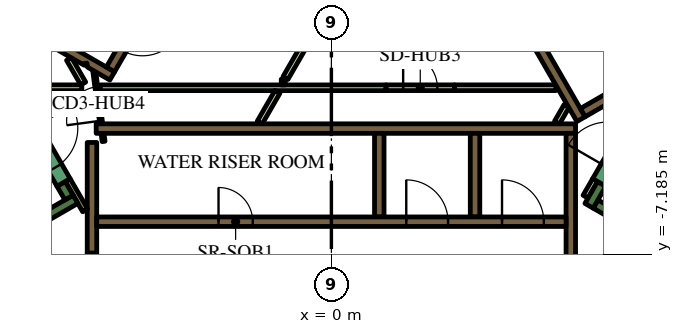
"""IFC4 building model, lengths in metres.
Left out: names, types, materials, properties, quantities, classifications, styles, units other than length and angle.
Written with IfcOpenShell. Run it as: python <this file> out.ifc"""

import sys

from ifc_helpers import new_model, si_unit, direction, frame, frame_2d, origin, place, context, subcontext, project, spatial, polyline, rectangle, outline, extrude, element, fill, save


model = new_model("IFC4")
c1 = context("Model", 3, precision=1e-05, world=origin(), true_north=direction((0.0, 1.0)))
c2 = subcontext(c1, "Body", "Model", "MODEL_VIEW")
j1 = project(units=[si_unit("LENGTHUNIT", "METRE"), si_unit("PLANEANGLEUNIT", "RADIAN")], contexts=[c1])
p1 = place(None, origin())
s1 = spatial("IfcSite", under=j1, at=p1, CompositionType="ELEMENT")
p2 = place(p1, origin())
s2 = spatial("IfcBuilding", under=s1, at=p2, CompositionType="ELEMENT")
p3 = place(p2, frame((0.0, 0.0, 54.9)))
s3 = spatial("IfcBuildingStorey", under=s2, at=p3, CompositionType="ELEMENT", Elevation=54.9)
p4 = place(p3, frame((6.776, 13.364, 0.0), z_axis=(0.0, 0.0, 1.0), x_axis=(0.500004177138, -0.8660229921, 0.0)))
e1 = element("IfcWall", 1, at=p4, inside=s3, PredefinedType="SOLIDWALL", context=c2, shape_type="SweptSolid", body=[
    extrude(rectangle(XDim=20.204, YDim=0.9, at=frame_2d((10.102, 0.0))), origin(), (0.0, 0.0, 1.0), 3.9),
])
p5 = place(p3, frame((12.84, -9.261, 0.0), z_axis=(0.0, 0.0, 1.0), x_axis=(-0.866013990052, 0.500019768644, 0.0)))
e2 = element("IfcWall", 2, at=p5, inside=s3, PredefinedType="SOLIDWALL", context=c2, shape_type="SweptSolid", body=[
    extrude(rectangle(XDim=6.8, YDim=0.25, at=frame_2d((3.4, 0.0))), origin(), (0.0, 0.0, 1.0), 3.9),
])
p6 = place(p3, frame((7.113, -5.33, 0.0), z_axis=(0.0, 0.0, 1.0), x_axis=(-0.499965889992, -0.866045096311, 0.0)))
e3 = element("IfcWall", 3, at=p6, inside=s3, PredefinedType="SOLIDWALL", context=c2, shape_type="SweptSolid", body=[
    extrude(rectangle(XDim=0.666, YDim=0.25, at=frame_2d((0.333, 0.0))), origin(), (0.0, 0.0, 1.0), 3.9),
])
p7 = place(p3, frame((-12.84, -9.261, 0.0), z_axis=(0.0, 0.0, 1.0), x_axis=(0.866016039709, 0.500016218704, 0.0)))
e4 = element("IfcWall", 4, at=p7, inside=s3, PredefinedType="SOLIDWALL", context=c2, shape_type="SweptSolid", body=[
    extrude(rectangle(XDim=7.05, YDim=0.25, at=frame_2d((3.525, 0.0))), origin(), (0.0, 0.0, 1.0), 3.9),
])
p8 = place(p3, frame((-6.905, -5.69, 0.0), z_axis=(0.0, 0.0, 1.0), x_axis=(-0.499993700073, 0.866029041019, 0.0)))
e5 = element("IfcWall", 5, at=p8, inside=s3, PredefinedType="SOLIDWALL", context=c2, shape_type="SweptSolid", body=[
    extrude(rectangle(XDim=0.416, YDim=0.25, at=frame_2d((0.208, 0.0))), origin(), (0.0, 0.0, 1.0), 3.9),
])
p9 = place(p3, frame((-6.3, -4.24, 0.0), z_axis=(0.0, 0.0, 1.0), x_axis=(0.0, -1.0, 0.0)))
e6 = element("IfcWall", 6, at=p9, inside=s3, PredefinedType="SOLIDWALL", context=c2, shape_type="SweptSolid", body=[
    extrude(rectangle(XDim=2.914, YDim=0.25, at=frame_2d((1.457, 0.0))), origin(), (0.0, 0.0, 1.0), 3.9),
])
p10 = place(p3, frame((-6.19, -3.875, 0.0), z_axis=(0.0, 0.0, 1.0), x_axis=(1.0, 0.0, 0.0)))
e7 = element("IfcWall", 7, at=p10, inside=s3, PredefinedType="SOLIDWALL", context=c2, shape_type="SweptSolid", body=[
    extrude(rectangle(XDim=12.615, YDim=0.25, at=frame_2d((6.307, 0.0))), origin(), (0.0, 0.0, 1.0), 3.9),
])
p11 = place(p3, frame((6.3, -7.268, 0.0), z_axis=(0.0, 0.0, 1.0), x_axis=(0.0, 1.0, 0.0)))
e8 = element("IfcWall", 8, at=p11, inside=s3, PredefinedType="SOLIDWALL", context=c2, shape_type="SweptSolid", body=[
    extrude(rectangle(XDim=3.268, YDim=0.25, at=frame_2d((1.634, 0.0))), origin(), (0.0, 0.0, 1.0), 3.9),
])
for number, where, z_axis, x_axis in (
    (9, (3.78, -4.0, 0.0), (0.0, 0.0, 1.0), (0.0, -1.0, 0.0)),
    (10, (1.26, -4.0, 0.0), (0.0, 0.0, 1.0), (0.0, -1.0, 0.0)),
):
    element("IfcWall", number, at=place(p3, frame(where, z_axis=z_axis, x_axis=x_axis)), inside=s3, PredefinedType="SOLIDWALL", context=c2, shape_type="SweptSolid", body=[
        extrude(rectangle(XDim=2.2, YDim=0.25, at=frame_2d((1.1, 0.0))), origin(), (0.0, 0.0, 1.0), 3.9),
    ])
p12 = place(p3, origin())
e11 = element("IfcWall", 11, at=p12, inside=s3, PredefinedType="SOLIDWALL", context=c2, shape_type="SweptSolid", body=[
    extrude(outline(polyline([(0.335, 6.925), (0.335, 6.925), (0.335, 7.075), (0.335, 7.075), (0.335, 7.075), (0.245, 7.075), (0.079, 7.363), (0.035, 7.439), (0.252, 7.564), (0.377, 7.348), (6.552, -3.348), (6.677, -3.564), (6.46, -3.689), (4.897, -0.981), (0.332, 6.925), (0.335, 6.925), (0.335, 6.925)])), origin(), (0.0, 0.0, 1.0), 3.9),
])
p13 = place(p3, frame((9.352, -1.875, 0.0), z_axis=(0.0, 0.0, 1.0), x_axis=(-0.866024844342, -0.500000968981, 0.0)))
e12 = element("IfcWall", 12, at=p13, inside=s3, PredefinedType="SOLIDWALL", context=c2, shape_type="SweptSolid", body=[
    extrude(rectangle(XDim=3.162, YDim=0.25, at=frame_2d((1.581, 0.0))), origin(), (0.0, 0.0, 1.0), 3.9),
])
e13 = element("IfcWall", 13, at=p12, inside=s3, PredefinedType="SOLIDWALL", context=c2, shape_type="SweptSolid", body=[
    extrude(outline(polyline([(-5.922, -2.257), (-5.922, -2.257), (-5.705, -2.382), (-5.83, -2.598), (-6.418, -2.258), (-6.433, -2.153), (-6.433, -2.153), (-6.433, -2.153), (-6.508, -2.163), (-6.508, -2.163), (-6.508, -2.163), (-6.501, -2.21), (-7.952, -1.373), (-7.827, -1.156), (-5.922, -2.257)])), origin(), (0.0, 0.0, 1.0), 3.9),
])
p14 = place(p3, frame((-6.48, -6.027, 0.0), z_axis=(0.0, 0.0, 1.0), x_axis=(-0.499936960004, 0.866061796884, 0.0)))
e14 = element("IfcWall", 14, at=p14, inside=s3, PredefinedType="PARTITIONING", context=c2, shape_type="SweptSolid", body=[
    extrude(rectangle(XDim=0.919, YDim=0.15, at=frame_2d((0.46, 0.0))), origin(), (0.0, 0.0, 1.0), 3.9),
])
p15 = place(p3, frame((-8.395, -2.8, 0.0), z_axis=(0.0, 0.0, 1.0), x_axis=(1.0, 0.0, 0.0)))
e15 = element("IfcWall", 15, at=p15, inside=s3, PredefinedType="PARTITIONING", context=c2, shape_type="SweptSolid", body=[
    extrude(rectangle(XDim=1.828, YDim=0.15, at=frame_2d((0.914, 0.0))), origin(), (0.0, 0.0, 1.0), 2.75),
])
p16 = place(p3, frame((-6.531, -2.689, 0.0), z_axis=(0.0, 0.0, 1.0), x_axis=(-0.499967446111, 0.866044197965, 0.0)))
e16 = element("IfcWall", 16, at=p16, inside=s3, PredefinedType="PARTITIONING", context=c2, shape_type="SweptSolid", body=[
    extrude(rectangle(XDim=0.748, YDim=0.15, at=frame_2d((0.374, 0.0))), origin(), (0.0, 0.0, 1.0), 2.75),
])
p17 = place(p3, frame((-6.086, -2.801, 0.0), z_axis=(0.0, 0.0, 1.0), x_axis=(1.0, 0.0, 0.0)))
e17 = element("IfcWall", 17, at=p17, inside=s3, PredefinedType="PARTITIONING", context=c2, shape_type="SweptSolid", body=[
    extrude(rectangle(XDim=7.524, YDim=0.15, at=frame_2d((3.762, 0.0))), origin(), (0.0, 0.0, 1.0), 2.75),
])
p18 = place(p3, frame((-1.887, -3.718, 0.0), z_axis=(0.0, 0.0, 1.0), x_axis=(0.499842898591, 0.866116087328, 0.0)))
e18 = element("IfcWall", 18, at=p18, inside=s3, PredefinedType="PARTITIONING", context=c2, shape_type="SweptSolid", body=[
    extrude(rectangle(XDim=0.936, YDim=0.15, at=frame_2d((0.468, 0.0))), origin(), (0.0, 0.0, 1.0), 2.75),
])
p19 = place(p3, frame((-1.212, -2.651, 0.0), z_axis=(0.0, 0.0, 1.0), x_axis=(-1.0, 0.0, 0.0)))
e19 = element("IfcWall", 19, at=p19, inside=s3, PredefinedType="PARTITIONING", context=c2, shape_type="SweptSolid", body=[
    extrude(rectangle(XDim=0.108, YDim=0.15, at=frame_2d((0.054, 0.0))), origin(), (0.0, 0.0, 1.0), 2.75),
])
p20 = place(p3, frame((-1.208, -2.544, 0.0), z_axis=(0.0, 0.0, 1.0), x_axis=(0.499995339376, 0.86602809458, 0.0)))
e20 = element("IfcWall", 20, at=p20, inside=s3, PredefinedType="PARTITIONING", context=c2, shape_type="SweptSolid", body=[
    extrude(rectangle(XDim=2.349, YDim=0.15, at=frame_2d((1.175, 0.0))), origin(), (0.0, 0.0, 1.0), 2.75),
])
p21 = place(p3, frame((6.688, -5.667, 0.0), z_axis=(0.0, 0.0, 1.0), x_axis=(0.499834152157, 0.86612113491, 0.0)))
e21 = element("IfcWall", 21, at=p21, inside=s3, PredefinedType="PARTITIONING", context=c2, shape_type="SweptSolid", body=[
    extrude(rectangle(XDim=0.505, YDim=0.15, at=frame_2d((0.252, 0.0))), origin(), (0.0, 0.0, 1.0), 2.75),
])
p22 = place(p3, frame((5.936, -3.718, 0.0), z_axis=(0.0, 0.0, 1.0), x_axis=(0.499890179513, 0.866088799389, 0.0)))
e22 = element("IfcWall", 22, at=p22, inside=s3, PredefinedType="PARTITIONING", context=c2, shape_type="SweptSolid", body=[
    extrude(rectangle(XDim=0.504, YDim=0.15, at=frame_2d((0.252, 0.0))), origin(), (0.0, 0.0, 1.0), 2.75),
])
p23 = place(p3, frame((3.238, -2.8, 0.0), z_axis=(0.0, 0.0, 1.0), x_axis=(1.0, 0.0, 0.0)))
e23 = element("IfcWall", 23, at=p23, inside=s3, PredefinedType="PARTITIONING", context=c2, shape_type="SweptSolid", body=[
    extrude(rectangle(XDim=2.672, YDim=0.15, at=frame_2d((1.336, 0.0))), origin(), (0.0, 0.0, 1.0), 2.75),
])
p24 = place(p3, frame((-6.175, -6.325, 0.0), z_axis=(0.0, 0.0, 1.0), x_axis=(1.0, 0.0, 0.0)))
e24 = element("IfcWall", 24, at=p24, inside=s3, PredefinedType="SOLIDWALL", context=c2, shape_type="SweptSolid", body=[
    extrude(rectangle(XDim=12.35, YDim=0.25, at=frame_2d((6.175, 0.0))), origin(), (0.0, 0.0, 1.0), 3.9),
])
p25 = place(p24, frame((3.205, 0.0, 0.0)))
e25 = element("IfcOpeningElement", 25, at=p25, cuts=e24, PredefinedType="OPENING", context=c2, shape_type="SweptSolid", body=[
    extrude(rectangle(XDim=0.9, YDim=2.1, at=frame_2d((0.45, 1.05))), frame((0.0, 0.135, 0.0), z_axis=(0.0, -1.0, 0.0), x_axis=(1.0, 0.0, 0.0)), (0.0, 0.0, 1.0), 0.27),
])
p26 = place(p24, frame((8.145, 0.0, 0.0)))
e26 = element("IfcOpeningElement", 26, at=p26, cuts=e24, PredefinedType="OPENING", context=c2, shape_type="SweptSolid", body=[
    extrude(rectangle(XDim=1.1, YDim=2.1, at=frame_2d((0.55, 1.05))), frame((0.0, 0.135, 0.0), z_axis=(0.0, -1.0, 0.0), x_axis=(1.0, 0.0, 0.0)), (0.0, 0.0, 1.0), 0.27),
])
p27 = place(p24, frame((10.665, 0.0, 0.0)))
e27 = element("IfcOpeningElement", 27, at=p27, cuts=e24, PredefinedType="OPENING", context=c2, shape_type="SweptSolid", body=[
    extrude(rectangle(XDim=1.1, YDim=2.1, at=frame_2d((0.55, 1.05))), frame((0.0, 0.135, 0.0), z_axis=(0.0, -1.0, 0.0), x_axis=(1.0, 0.0, 0.0)), (0.0, 0.0, 1.0), 0.27),
])
p28 = place(p3, frame((8.565, -2.185, 0.0), z_axis=(0.0, 0.0, 1.0), x_axis=(-0.499997954832, 0.866026584559, 0.0)))
e28 = element("IfcWall", 28, at=p28, inside=s3, PredefinedType="SOLIDWALL", context=c2, shape_type="SweptSolid", body=[
    extrude(rectangle(XDim=12.35, YDim=0.25, at=frame_2d((6.175, 0.0))), origin(), (0.0, 0.0, 1.0), 3.9),
])
p29 = place(p28, frame((5.725, 0.0, 0.0)))
e29 = element("IfcOpeningElement", 29, at=p29, cuts=e28, PredefinedType="OPENING", context=c2, shape_type="SweptSolid", body=[
    extrude(rectangle(XDim=0.9, YDim=2.1, at=frame_2d((0.45, 1.05))), frame((0.0, 0.135, 0.0), z_axis=(0.0, -1.0, 0.0), x_axis=(1.0, 0.0, 0.0)), (0.0, 0.0, 1.0), 0.27),
])
p30 = place(p3, frame((-0.898, 6.194, 0.0), z_axis=(0.0, 0.0, 1.0), x_axis=(-0.499996202215, -0.866027596426, 0.0)))
e30 = element("IfcWall", 30, at=p30, inside=s3, PredefinedType="SOLIDWALL", context=c2, shape_type="SweptSolid", body=[
    extrude(rectangle(XDim=9.83, YDim=0.25, at=frame_2d((4.915, 0.0))), origin(), (0.0, 0.0, 1.0), 3.9),
])
p31 = place(p30, frame((0.585, 0.0, 0.0)))
e31 = element("IfcOpeningElement", 31, at=p31, cuts=e30, PredefinedType="OPENING", context=c2, shape_type="SweptSolid", body=[
    extrude(rectangle(XDim=1.1, YDim=2.1, at=frame_2d((0.55, 1.05))), frame((0.0, 0.135, 0.0), z_axis=(0.0, -1.0, 0.0), x_axis=(1.0, 0.0, 0.0)), (0.0, 0.0, 1.0), 0.27),
])
p32 = place(p30, frame((3.105, 0.0, 0.0)))
e32 = element("IfcOpeningElement", 32, at=p32, cuts=e30, PredefinedType="OPENING", context=c2, shape_type="SweptSolid", body=[
    extrude(rectangle(XDim=1.1, YDim=2.1, at=frame_2d((0.55, 1.05))), frame((0.0, 0.135, 0.0), z_axis=(0.0, -1.0, 0.0), x_axis=(1.0, 0.0, 0.0)), (0.0, 0.0, 1.0), 0.27),
])
p33 = place(p30, frame((5.625, 0.0, 0.0)))
e33 = element("IfcOpeningElement", 33, at=p33, cuts=e30, PredefinedType="OPENING", context=c2, shape_type="SweptSolid", body=[
    extrude(rectangle(XDim=1.1, YDim=2.1, at=frame_2d((0.55, 1.05))), frame((0.0, 0.135, 0.0), z_axis=(0.0, -1.0, 0.0), x_axis=(1.0, 0.0, 0.0)), (0.0, 0.0, 1.0), 0.27),
])
p34 = place(p30, frame((8.145, 0.0, 0.0)))
e34 = element("IfcOpeningElement", 34, at=p34, cuts=e30, PredefinedType="OPENING", context=c2, shape_type="SweptSolid", body=[
    extrude(rectangle(XDim=1.1, YDim=2.1, at=frame_2d((0.55, 1.05))), frame((0.0, 0.135, 0.0), z_axis=(0.0, -1.0, 0.0), x_axis=(1.0, 0.0, 0.0)), (0.0, 0.0, 1.0), 0.27),
])
p35 = place(p3, frame((7.048, -5.292, 0.0), z_axis=(0.0, 0.0, 1.0), x_axis=(0.49994051562, 0.866059744384, 0.0)))
e35 = element("IfcWall", 35, at=p35, inside=s3, PredefinedType="SOLIDWALL", context=c2, shape_type="SweptSolid", body=[
    extrude(rectangle(XDim=2.1, YDim=0.4, at=frame_2d((1.05, 0.0))), origin(), (0.0, 0.0, 1.0), 3.9),
])
p36 = place(p35, frame((0.45, 0.0, 0.0)))
e36 = element("IfcOpeningElement", 36, at=p36, cuts=e35, PredefinedType="OPENING", context=c2, shape_type="SweptSolid", body=[
    extrude(rectangle(XDim=1.2, YDim=2.1, at=frame_2d((0.6, 1.05))), frame((0.0, 0.21, 0.0), z_axis=(0.0, -1.0, 0.0), x_axis=(1.0, 0.0, 0.0)), (0.0, 0.0, 1.0), 0.42),
])
p37 = place(p3, frame((-8.098, -3.474, 0.0), z_axis=(0.0, 0.0, 1.0), x_axis=(0.49994051562, -0.866059744384, 0.0)))
e37 = element("IfcWall", 37, at=p37, inside=s3, PredefinedType="SOLIDWALL", context=c2, shape_type="SweptSolid", body=[
    extrude(rectangle(XDim=2.1, YDim=0.4, at=frame_2d((1.05, 0.0))), origin(), (0.0, 0.0, 1.0), 3.9),
])
p38 = place(p37, frame((0.45, 0.0, 0.0)))
e38 = element("IfcOpeningElement", 38, at=p38, cuts=e37, PredefinedType="OPENING", context=c2, shape_type="SweptSolid", body=[
    extrude(rectangle(XDim=1.2, YDim=2.1, at=frame_2d((0.6, 1.05))), frame((0.0, 0.21, 0.0), z_axis=(0.0, -1.0, 0.0), x_axis=(1.0, 0.0, 0.0)), (0.0, 0.0, 1.0), 0.42),
])
p39 = place(p3, frame((-6.3, -7.154, 0.0), z_axis=(0.0, 0.0, 1.0), x_axis=(0.0, -1.0, 0.0)))
e39 = element("IfcWall", 39, at=p39, inside=s3, PredefinedType="SOLIDWALL", context=c2, shape_type="SweptSolid", body=[
    extrude(rectangle(XDim=1.8, YDim=0.25, at=frame_2d((0.9, 0.0))), origin(), (0.0, 0.0, 1.0), 3.9),
])
p40 = place(p39, frame((0.45, 0.0, 0.0)))
e40 = element("IfcOpeningElement", 40, at=p40, cuts=e39, PredefinedType="OPENING", context=c2, shape_type="SweptSolid", body=[
    extrude(rectangle(XDim=0.9, YDim=2.1, at=frame_2d((0.45, 1.05))), frame((0.0, 0.135, 0.0), z_axis=(0.0, -1.0, 0.0), x_axis=(1.0, 0.0, 0.0)), (0.0, 0.0, 1.0), 0.27),
])
p41 = place(p3, frame((-5.995, -4.213, 0.0), z_axis=(0.0, 0.0, 1.0), x_axis=(-0.132072335448, 0.991240081014, 0.0)))
e41 = element("IfcWall", 41, at=p41, inside=s3, PredefinedType="PARTITIONING", context=c2, shape_type="SweptSolid", body=[
    extrude(rectangle(XDim=2.1, YDim=0.076, at=frame_2d((1.05, 0.0))), origin(), (0.0, 0.0, 1.0), 2.75),
])
p42 = place(p41, frame((0.55, 0.0, 0.0)))
e42 = element("IfcOpeningElement", 42, at=p42, cuts=e41, PredefinedType="OPENING", context=c2, shape_type="SweptSolid", body=[
    extrude(rectangle(XDim=0.9, YDim=2.1, at=frame_2d((0.45, 1.05))), frame((0.0, 0.048, 0.0), z_axis=(0.0, -1.0, 0.0), x_axis=(1.0, 0.0, 0.0)), (0.0, 0.0, 1.0), 0.096),
])
p43 = place(p3, frame((1.438, -2.8, 0.0), z_axis=(0.0, 0.0, 1.0), x_axis=(1.0, 0.0, 0.0)))
e43 = element("IfcWall", 43, at=p43, inside=s3, PredefinedType="PARTITIONING", context=c2, shape_type="SweptSolid", body=[
    extrude(rectangle(XDim=1.8, YDim=0.15, at=frame_2d((0.9, 0.0))), origin(), (0.0, 0.0, 1.0), 2.75),
])
p44 = place(p43, frame((0.45, 0.0, 0.0)))
e44 = element("IfcOpeningElement", 44, at=p44, cuts=e43, PredefinedType="OPENING", context=c2, shape_type="SweptSolid", body=[
    extrude(rectangle(XDim=0.9, YDim=2.1, at=frame_2d((0.45, 1.05))), frame((0.0, 0.085, 0.0), z_axis=(0.0, -1.0, 0.0), x_axis=(1.0, 0.0, 0.0)), (0.0, 0.0, 1.0), 0.17),
])
p45 = place(p3, frame((6.163, 18.475, 0.0), z_axis=(0.0, 0.0, 1.0), x_axis=(0.500001317485, -0.866024643133, 0.0)))
e45 = element("IfcWall", 45, at=p45, inside=s3, PredefinedType="PARTITIONING", context=c2, shape_type="SweptSolid", body=[
    extrude(rectangle(XDim=25.767, YDim=0.15, at=frame_2d((12.883, 0.0))), origin(), (0.0, 0.0, 1.0), 2.75),
])
p46 = place(p45, frame((24.586, 0.0, 0.0)))
e46 = element("IfcOpeningElement", 46, at=p46, cuts=e45, PredefinedType="OPENING", context=c2, shape_type="SweptSolid", body=[
    extrude(rectangle(XDim=1.0, YDim=2.1, at=frame_2d((0.5, 1.05))), frame((0.0, 0.085, 0.0), z_axis=(0.0, -1.0, 0.0), x_axis=(1.0, 0.0, 0.0)), (0.0, 0.0, 1.0), 0.17),
])
p47 = place(p45, frame((13.144, 0.0, 0.0)))
e47 = element("IfcOpeningElement", 47, at=p47, cuts=e45, PredefinedType="OPENING", context=c2, shape_type="SweptSolid", body=[
    extrude(rectangle(XDim=1.0, YDim=2.1, at=frame_2d((0.5, 1.05))), frame((0.0, 0.085, 0.0), z_axis=(0.0, -1.0, 0.0), x_axis=(1.0, 0.0, 0.0)), (0.0, 0.0, 1.0), 0.17),
])
p48 = place(p45, frame((11.692, 0.0, 0.0)))
e48 = element("IfcOpeningElement", 48, at=p48, cuts=e45, PredefinedType="OPENING", context=c2, shape_type="SweptSolid", body=[
    extrude(rectangle(XDim=1.0, YDim=2.1, at=frame_2d((0.5, 1.05))), frame((0.0, 0.085, 0.0), z_axis=(0.0, -1.0, 0.0), x_axis=(1.0, 0.0, 0.0)), (0.0, 0.0, 1.0), 0.17),
])
p49 = place(p45, frame((0.572, 0.0, 0.0)))
e49 = element("IfcOpeningElement", 49, at=p49, cuts=e45, PredefinedType="OPENING", context=c2, shape_type="SweptSolid", body=[
    extrude(rectangle(XDim=1.0, YDim=2.1, at=frame_2d((0.5, 1.05))), frame((0.0, 0.085, 0.0), z_axis=(0.0, -1.0, 0.0), x_axis=(1.0, 0.0, 0.0)), (0.0, 0.0, 1.0), 0.17),
])
p50 = place(p3, frame((-19.081, -3.9, 0.0), z_axis=(0.0, 0.0, 1.0), x_axis=(0.499998313975, 0.866026377209, 0.0)))
e50 = element("IfcWall", 50, at=p50, inside=s3, PredefinedType="PARTITIONING", context=c2, shape_type="SweptSolid", body=[
    extrude(rectangle(XDim=25.766, YDim=0.15, at=frame_2d((12.883, 0.0))), origin(), (0.0, 0.0, 1.0), 2.75),
])
p51 = place(p50, frame((22.445, 0.0, 0.0)))
e51 = element("IfcOpeningElement", 51, at=p51, cuts=e50, PredefinedType="OPENING", context=c2, shape_type="SweptSolid", body=[
    extrude(rectangle(XDim=1.0, YDim=2.1, at=frame_2d((0.5, 1.05))), frame((0.0, 0.085, 0.0), z_axis=(0.0, -1.0, 0.0), x_axis=(1.0, 0.0, 0.0)), (0.0, 0.0, 1.0), 0.17),
])
p52 = place(p50, frame((21.138, 0.0, 0.0)))
e52 = element("IfcOpeningElement", 52, at=p52, cuts=e50, PredefinedType="OPENING", context=c2, shape_type="SweptSolid", body=[
    extrude(rectangle(XDim=1.0, YDim=2.1, at=frame_2d((0.5, 1.05))), frame((0.0, 0.085, 0.0), z_axis=(0.0, -1.0, 0.0), x_axis=(1.0, 0.0, 0.0)), (0.0, 0.0, 1.0), 0.17),
])
p53 = place(p50, frame((14.066, 0.0, 0.0)))
e53 = element("IfcOpeningElement", 53, at=p53, cuts=e50, PredefinedType="OPENING", context=c2, shape_type="SweptSolid", body=[
    extrude(rectangle(XDim=0.9, YDim=2.1, at=frame_2d((0.45, 1.05))), frame((0.0, 0.085, 0.0), z_axis=(0.0, -1.0, 0.0), x_axis=(1.0, 0.0, 0.0)), (0.0, 0.0, 1.0), 0.17),
])
p54 = place(p50, frame((11.693, 0.0, 0.0)))
e54 = element("IfcOpeningElement", 54, at=p54, cuts=e50, PredefinedType="OPENING", context=c2, shape_type="SweptSolid", body=[
    extrude(rectangle(XDim=1.0, YDim=2.1, at=frame_2d((0.5, 1.05))), frame((0.0, 0.085, 0.0), z_axis=(0.0, -1.0, 0.0), x_axis=(1.0, 0.0, 0.0)), (0.0, 0.0, 1.0), 0.17),
])
p55 = place(p25, origin())
e55 = element("IfcDoor", 55, at=p55, inside=s3, OperationType="SINGLE_SWING_LEFT", PredefinedType="DOOR", context=c2, shape_type="SweptSolid", body=[
    extrude(rectangle(XDim=0.9, YDim=2.1, at=frame_2d((0.45, 1.05))), frame((0.0, 0.025, 0.0), z_axis=(0.0, -1.0, 0.0), x_axis=(1.0, 0.0, 0.0)), (0.0, 0.0, 1.0), 0.05),
])
fill(e25, e55)
p56 = place(p26, origin())
e56 = element("IfcDoor", 56, at=p56, inside=s3, OperationType="DOUBLE_DOOR_SLIDING", PredefinedType="DOOR", context=c2, shape_type="SweptSolid", body=[
    extrude(rectangle(XDim=1.1, YDim=2.1, at=frame_2d((0.55, 1.05))), frame((0.0, 0.025, 0.0), z_axis=(0.0, -1.0, 0.0), x_axis=(1.0, 0.0, 0.0)), (0.0, 0.0, 1.0), 0.05),
])
fill(e26, e56)
p57 = place(p27, origin())
e57 = element("IfcDoor", 57, at=p57, inside=s3, OperationType="DOUBLE_DOOR_SLIDING", PredefinedType="DOOR", context=c2, shape_type="SweptSolid", body=[
    extrude(rectangle(XDim=1.1, YDim=2.1, at=frame_2d((0.55, 1.05))), frame((0.0, 0.025, 0.0), z_axis=(0.0, -1.0, 0.0), x_axis=(1.0, 0.0, 0.0)), (0.0, 0.0, 1.0), 0.05),
])
fill(e27, e57)
p58 = place(p38, origin())
e58 = element("IfcDoor", 58, at=p58, inside=s3, OperationType="SINGLE_SWING_LEFT", PredefinedType="DOOR", context=c2, shape_type="SweptSolid", body=[
    extrude(rectangle(XDim=1.2, YDim=2.1, at=frame_2d((0.6, 1.05))), frame((0.0, 0.025, 0.0), z_axis=(0.0, -1.0, 0.0), x_axis=(1.0, 0.0, 0.0)), (0.0, 0.0, 1.0), 0.05),
])
fill(e38, e58)
p59 = place(p42, origin())
e59 = element("IfcDoor", 59, at=p59, inside=s3, OperationType="SINGLE_SWING_LEFT", PredefinedType="DOOR", context=c2, shape_type="SweptSolid", body=[
    extrude(rectangle(XDim=0.9, YDim=2.1, at=frame_2d((0.45, 1.05))), frame((0.0, 0.025, 0.0), z_axis=(0.0, -1.0, 0.0), x_axis=(1.0, 0.0, 0.0)), (0.0, 0.0, 1.0), 0.05),
])
fill(e42, e59)
p60 = place(p44, origin())
e60 = element("IfcDoor", 60, at=p60, inside=s3, OperationType="SINGLE_SWING_LEFT", PredefinedType="DOOR", context=c2, shape_type="SweptSolid", body=[
    extrude(rectangle(XDim=0.9, YDim=2.1, at=frame_2d((0.45, 1.05))), frame((0.0, 0.025, 0.0), z_axis=(0.0, -1.0, 0.0), x_axis=(1.0, 0.0, 0.0)), (0.0, 0.0, 1.0), 0.05),
])
fill(e44, e60)
save(model, sys.argv[1])
